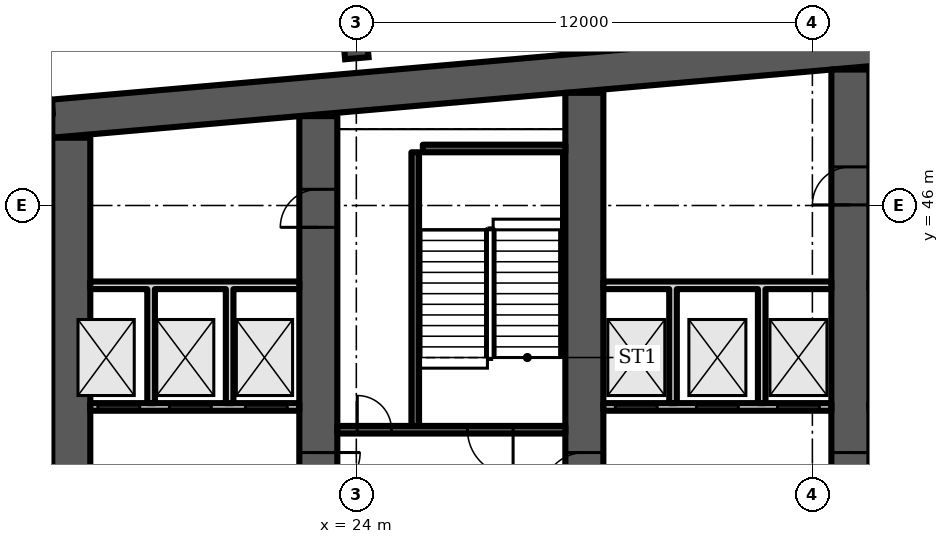
"""IFC4 building model, lengths in metres.
Left out: names, types, materials, properties, quantities, classifications, styles, units other than length and angle.
Written with IfcOpenShell. Run it as: python <this file> out.ifc"""

import sys

from ifc_helpers import new_model, si_unit, direction, frame, frame_2d, origin, origin_2d, place, context, subcontext, project, spatial, polyline, rectangle, i_section, outline, extrude, element, fill, save


model = new_model("IFC4")
c1 = context("Model", 3, precision=1e-05, world=origin(), true_north=direction((0.0, 1.0)))
c2 = subcontext(c1, "Body", "Model", "MODEL_VIEW")
j1 = project(units=[si_unit("LENGTHUNIT", "METRE"), si_unit("PLANEANGLEUNIT", "RADIAN")], contexts=[c1])
p1 = place(None, origin())
s1 = spatial("IfcSite", under=j1, at=p1, CompositionType="ELEMENT")
p2 = place(p1, origin())
s2 = spatial("IfcBuilding", under=s1, at=p2, CompositionType="ELEMENT")
p3 = place(p2, frame((0.0, 0.0, 147.1)))
s3 = spatial("IfcBuildingStorey", under=s2, at=p3, CompositionType="ELEMENT", Elevation=147.1)
p4 = place(p3, frame((0.0, 0.0, -0.0)))
e1 = element("IfcWall", 1, at=p4, inside=s3, PredefinedType="SHEAR", context=c2, shape_type="SweptSolid", body=[
    extrude(outline(polyline([(16.0, 47.784), (40.5, 49.927), (65.0, 47.784), (65.0, 48.787), (40.5, 50.931), (16.0, 48.787), (16.0, 47.784)])), origin(), (0.0, 0.0, 1.0), 4.8),
])
p5 = place(p3, frame((16.5, 35.0, 0.0), z_axis=(0.0, 0.0, 1.0), x_axis=(0.0, 1.0, 0.0)))
e2 = element("IfcWall", 2, at=p5, inside=s3, PredefinedType="SHEAR", context=c2, shape_type="SweptSolid", body=[
    extrude(rectangle(XDim=12.784, YDim=1.0, at=frame_2d((6.392, 0.0))), origin(), (0.0, 0.0, 1.0), 4.8),
])
p6 = place(p3, frame((23.0, 35.0, 0.0), z_axis=(0.0, 0.0, 1.0), x_axis=(0.0, 1.0, 0.0)))
e3 = element("IfcWall", 3, at=p6, inside=s3, PredefinedType="SHEAR", context=c2, shape_type="SweptSolid", body=[
    extrude(rectangle(XDim=13.352, YDim=1.0, at=frame_2d((6.676, 0.0))), origin(), (0.0, 0.0, 1.0), 4.8),
])
p7 = place(p6, frame((10.426, 0.0, 0.0)))
e4 = element("IfcOpeningElement", 4, at=p7, cuts=e3, PredefinedType="OPENING", context=c2, shape_type="SweptSolid", body=[
    extrude(rectangle(XDim=1.0, YDim=2.1, at=frame_2d((0.5, 1.05))), frame((0.0, 0.51, 0.0), z_axis=(0.0, -1.0, 0.0), x_axis=(1.0, 0.0, 0.0)), (0.0, 0.0, 1.0), 1.02),
])
p8 = place(p6, frame((3.4, 0.0, 0.0)))
e5 = element("IfcOpeningElement", 5, at=p8, cuts=e3, PredefinedType="OPENING", context=c2, shape_type="SweptSolid", body=[
    extrude(rectangle(XDim=1.1, YDim=2.1, at=frame_2d((0.55, 1.05))), frame((0.0, 0.51, 0.0), z_axis=(0.0, -1.0, 0.0), x_axis=(1.0, 0.0, 0.0)), (0.0, 0.0, 1.0), 1.02),
])
p9 = place(p3, frame((30.0, 35.0, 0.0), z_axis=(0.0, 0.0, 1.0), x_axis=(0.0, 1.0, 0.0)))
e6 = element("IfcWall", 6, at=p9, inside=s3, PredefinedType="SHEAR", context=c2, shape_type="SweptSolid", body=[
    extrude(rectangle(XDim=13.965, YDim=1.0, at=frame_2d((6.982, 0.0))), origin(), (0.0, 0.0, 1.0), 4.8),
])
p10 = place(p9, frame((3.4, 0.0, 0.0)))
e7 = element("IfcOpeningElement", 7, at=p10, cuts=e6, PredefinedType="OPENING", context=c2, shape_type="SweptSolid", body=[
    extrude(rectangle(XDim=1.1, YDim=2.1, at=frame_2d((0.55, 1.05))), frame((0.0, 0.51, 0.0), z_axis=(0.0, -1.0, 0.0), x_axis=(1.0, 0.0, 0.0)), (0.0, 0.0, 1.0), 1.02),
])
p11 = place(p3, frame((37.0, 35.0, 0.0), z_axis=(0.0, 0.0, 1.0), x_axis=(0.0, 1.0, 0.0)))
e8 = element("IfcWall", 8, at=p11, inside=s3, PredefinedType="SHEAR", context=c2, shape_type="SweptSolid", body=[
    extrude(rectangle(XDim=14.577, YDim=1.0, at=frame_2d((7.289, 0.0))), origin(), (0.0, 0.0, 1.0), 4.8),
])
p12 = place(p11, frame((11.016, 0.0, 0.0)))
e9 = element("IfcOpeningElement", 9, at=p12, cuts=e8, PredefinedType="OPENING", context=c2, shape_type="SweptSolid", body=[
    extrude(rectangle(XDim=1.0, YDim=2.1, at=frame_2d((0.5, 1.05))), frame((0.0, 0.51, 0.0), z_axis=(0.0, -1.0, 0.0), x_axis=(1.0, 0.0, 0.0)), (0.0, 0.0, 1.0), 1.02),
])
p13 = place(p11, frame((3.4, 0.0, 0.0)))
e10 = element("IfcOpeningElement", 10, at=p13, cuts=e8, PredefinedType="OPENING", context=c2, shape_type="SweptSolid", body=[
    extrude(rectangle(XDim=1.1, YDim=2.1, at=frame_2d((0.55, 1.05))), frame((0.0, 0.51, 0.0), z_axis=(0.0, -1.0, 0.0), x_axis=(1.0, 0.0, 0.0)), (0.0, 0.0, 1.0), 1.02),
])
p14 = place(p3, frame((24.0, 50.027, 0.0), z_axis=(0.0, 0.0, 1.0), x_axis=(-0.087156, 0.996198, 0.0)))
e11 = element("IfcColumn", 11, at=p14, inside=s3, PredefinedType="COLUMN", context=c2, shape_type="SweptSolid", body=[
    extrude(i_section(OverallWidth=0.305, OverallDepth=0.62, WebThickness=0.021, FlangeThickness=0.04, FilletRadius=0.027, at=origin_2d()), origin(), (0.0, 0.0, 1.0), 4.8),
])
p15 = place(p3, frame((16.0, 48.587, 0.0), z_axis=(0.0, 0.0, 1.0), x_axis=(-0.996194, -0.087168, 0.0)))
e12 = element("IfcWall", 12, at=p15, inside=s3, PredefinedType="SOLIDWALL", context=c2, shape_type="SweptSolid", body=[
    extrude(rectangle(XDim=2.994, YDim=0.4, at=frame_2d((1.497, 0.0))), origin(), (0.0, 0.0, 1.0), 4.4),
])
p16 = place(p3, frame((17.0, 40.7, 0.0), z_axis=(0.0, 0.0, 1.0), x_axis=(1.0, 0.0, 0.0)))
e13 = element("IfcWall", 13, at=p16, inside=s3, PredefinedType="PARTITIONING", context=c2, shape_type="SweptSolid", body=[
    extrude(rectangle(XDim=5.5, YDim=0.2, at=frame_2d((2.75, 0.0))), origin(), (0.0, 0.0, 1.0), 4.4),
])
p17 = place(p16, frame((0.2, 0.0, 0.0)))
e14 = element("IfcOpeningElement", 14, at=p17, cuts=e13, PredefinedType="OPENING", context=c2, shape_type="SweptSolid", body=[
    extrude(rectangle(XDim=1.1, YDim=2.1, at=frame_2d((0.55, 1.05))), frame((0.0, 0.11, 0.0), z_axis=(0.0, -1.0, 0.0), x_axis=(1.0, 0.0, 0.0)), (0.0, 0.0, 1.0), 0.22),
])
p18 = place(p16, frame((2.083, 0.0, 0.0)))
e15 = element("IfcOpeningElement", 15, at=p18, cuts=e13, PredefinedType="OPENING", context=c2, shape_type="SweptSolid", body=[
    extrude(rectangle(XDim=1.1, YDim=2.1, at=frame_2d((0.55, 1.05))), frame((0.0, 0.11, 0.0), z_axis=(0.0, -1.0, 0.0), x_axis=(1.0, 0.0, 0.0)), (0.0, 0.0, 1.0), 0.22),
])
p19 = place(p16, frame((4.083, 0.0, 0.0)))
e16 = element("IfcOpeningElement", 16, at=p19, cuts=e13, PredefinedType="OPENING", context=c2, shape_type="SweptSolid", body=[
    extrude(rectangle(XDim=1.1, YDim=2.1, at=frame_2d((0.55, 1.05))), frame((0.0, 0.11, 0.0), z_axis=(0.0, -1.0, 0.0), x_axis=(1.0, 0.0, 0.0)), (0.0, 0.0, 1.0), 0.22),
])
p20 = place(p3, frame((0.0, 0.0, -0.0)))
e17 = element("IfcWall", 17, at=p20, inside=s3, PredefinedType="PARTITIONING", context=c2, shape_type="SweptSolid", body=[
    extrude(outline(polyline([(18.7, 40.8), (18.5, 40.8), (18.5, 43.8), (17.0, 43.8), (17.0, 44.0), (22.5, 44.0), (22.5, 43.8), (20.767, 43.8), (20.767, 40.8), (20.567, 40.8), (20.567, 43.8), (18.7, 43.8), (18.7, 40.8)])), origin(), (0.0, 0.0, 1.0), 4.4),
])
p21 = place(p3, frame((23.5, 40.1, 0.0), z_axis=(0.0, 0.0, 1.0), x_axis=(1.0, 0.0, 0.0)))
e18 = element("IfcWall", 18, at=p21, inside=s3, PredefinedType="SHEAR", context=c2, shape_type="SweptSolid", body=[
    extrude(rectangle(XDim=6.0, YDim=0.2, at=frame_2d((3.0, 0.0))), origin(), (0.0, 0.0, 1.0), 4.4),
])
p22 = place(p21, frame((3.425, 0.0, 0.0)))
e19 = element("IfcOpeningElement", 19, at=p22, cuts=e18, PredefinedType="OPENING", context=c2, shape_type="SweptSolid", body=[
    extrude(rectangle(XDim=1.2, YDim=2.1, at=frame_2d((0.6, 1.05))), frame((0.0, 0.11, 0.0), z_axis=(0.0, -1.0, 0.0), x_axis=(1.0, 0.0, 0.0)), (0.0, 0.0, 1.0), 0.22),
])
p23 = place(p21, frame((0.525, 0.0, 0.0)))
e20 = element("IfcOpeningElement", 20, at=p23, cuts=e18, PredefinedType="OPENING", context=c2, shape_type="SweptSolid", body=[
    extrude(rectangle(XDim=0.9, YDim=2.1, at=frame_2d((0.45, 1.05))), frame((0.0, 0.11, 0.0), z_axis=(0.0, -1.0, 0.0), x_axis=(1.0, 0.0, 0.0)), (0.0, 0.0, 1.0), 0.22),
])
p24 = place(p3, frame((25.55, 40.2, 0.0), z_axis=(0.0, 0.0, 1.0), x_axis=(0.0, 1.0, 0.0)))
e21 = element("IfcWall", 21, at=p24, inside=s3, PredefinedType="SHEAR", context=c2, shape_type="SweptSolid", body=[
    extrude(rectangle(XDim=7.2, YDim=0.2, at=frame_2d((3.6, 0.0))), origin(), (0.0, 0.0, 1.0), 4.4),
])
p25 = place(p3, frame((25.75, 47.5, 0.0), z_axis=(0.0, 0.0, 1.0), x_axis=(1.0, 0.0, 0.0)))
e22 = element("IfcWall", 22, at=p25, inside=s3, PredefinedType="SHEAR", context=c2, shape_type="SweptSolid", body=[
    extrude(rectangle(XDim=3.75, YDim=0.2, at=frame_2d((1.875, 0.0))), origin(), (0.0, 0.0, 1.0), 4.4),
])
p26 = place(p3, frame((30.5, 40.7, 0.0), z_axis=(0.0, 0.0, 1.0), x_axis=(1.0, 0.0, 0.0)))
e23 = element("IfcWall", 23, at=p26, inside=s3, PredefinedType="PARTITIONING", context=c2, shape_type="SweptSolid", body=[
    extrude(rectangle(XDim=6.0, YDim=0.2, at=frame_2d((3.0, 0.0))), origin(), (0.0, 0.0, 1.0), 4.4),
])
p27 = place(p26, frame((0.317, 0.0, 0.0)))
e24 = element("IfcOpeningElement", 24, at=p27, cuts=e23, PredefinedType="OPENING", context=c2, shape_type="SweptSolid", body=[
    extrude(rectangle(XDim=1.1, YDim=2.1, at=frame_2d((0.55, 1.05))), frame((0.0, 0.11, 0.0), z_axis=(0.0, -1.0, 0.0), x_axis=(1.0, 0.0, 0.0)), (0.0, 0.0, 1.0), 0.22),
])
p28 = place(p26, frame((2.45, 0.0, 0.0)))
e25 = element("IfcOpeningElement", 25, at=p28, cuts=e23, PredefinedType="OPENING", context=c2, shape_type="SweptSolid", body=[
    extrude(rectangle(XDim=1.1, YDim=2.1, at=frame_2d((0.55, 1.05))), frame((0.0, 0.11, 0.0), z_axis=(0.0, -1.0, 0.0), x_axis=(1.0, 0.0, 0.0)), (0.0, 0.0, 1.0), 0.22),
])
p29 = place(p26, frame((4.583, 0.0, 0.0)))
e26 = element("IfcOpeningElement", 26, at=p29, cuts=e23, PredefinedType="OPENING", context=c2, shape_type="SweptSolid", body=[
    extrude(rectangle(XDim=1.1, YDim=2.1, at=frame_2d((0.55, 1.05))), frame((0.0, 0.11, 0.0), z_axis=(0.0, -1.0, 0.0), x_axis=(1.0, 0.0, 0.0)), (0.0, 0.0, 1.0), 0.22),
])
p30 = place(p3, frame((0.0, 0.0, -0.0)))
e27 = element("IfcWall", 27, at=p30, inside=s3, PredefinedType="PARTITIONING", context=c2, shape_type="SweptSolid", body=[
    extrude(outline(polyline([(32.433, 40.8), (32.233, 40.8), (32.233, 43.8), (30.5, 43.8), (30.5, 44.0), (36.5, 44.0), (36.5, 43.8), (34.767, 43.8), (34.767, 40.8), (34.567, 40.8), (34.567, 43.8), (32.433, 43.8), (32.433, 40.8)])), origin(), (0.0, 0.0, 1.0), 4.4),
])
p31 = place(p17, origin())
e28 = element("IfcDoor", 28, at=p31, inside=s3, OperationType="DOUBLE_DOOR_SLIDING", PredefinedType="DOOR", context=c2, shape_type="SweptSolid", body=[
    extrude(rectangle(XDim=1.1, YDim=2.1, at=frame_2d((0.55, 1.05))), frame((0.0, 0.025, 0.0), z_axis=(0.0, -1.0, 0.0), x_axis=(1.0, 0.0, 0.0)), (0.0, 0.0, 1.0), 0.05),
])
fill(e14, e28)
p32 = place(p18, origin())
e29 = element("IfcDoor", 29, at=p32, inside=s3, OperationType="DOUBLE_DOOR_SLIDING", PredefinedType="DOOR", context=c2, shape_type="SweptSolid", body=[
    extrude(rectangle(XDim=1.1, YDim=2.1, at=frame_2d((0.55, 1.05))), frame((0.0, 0.025, 0.0), z_axis=(0.0, -1.0, 0.0), x_axis=(1.0, 0.0, 0.0)), (0.0, 0.0, 1.0), 0.05),
])
fill(e15, e29)
p33 = place(p19, origin())
e30 = element("IfcDoor", 30, at=p33, inside=s3, OperationType="DOUBLE_DOOR_SLIDING", PredefinedType="DOOR", context=c2, shape_type="SweptSolid", body=[
    extrude(rectangle(XDim=1.1, YDim=2.1, at=frame_2d((0.55, 1.05))), frame((0.0, 0.025, 0.0), z_axis=(0.0, -1.0, 0.0), x_axis=(1.0, 0.0, 0.0)), (0.0, 0.0, 1.0), 0.05),
])
fill(e16, e30)
p34 = place(p7, origin())
e31 = element("IfcDoor", 31, at=p34, inside=s3, OperationType="SINGLE_SWING_LEFT", PredefinedType="DOOR", context=c2, shape_type="SweptSolid", body=[
    extrude(rectangle(XDim=1.0, YDim=2.1, at=frame_2d((0.5, 1.05))), frame((0.0, 0.5, 0.0), z_axis=(0.0, -1.0, 0.0), x_axis=(1.0, 0.0, 0.0)), (0.0, 0.0, 1.0), 1.0),
])
fill(e4, e31)
p35 = place(p22, origin())
e32 = element("IfcDoor", 32, at=p35, inside=s3, OperationType="SINGLE_SWING_RIGHT", PredefinedType="DOOR", context=c2, shape_type="SweptSolid", body=[
    extrude(rectangle(XDim=1.2, YDim=2.1, at=frame_2d((0.6, 1.05))), frame((0.0, 0.025, 0.0), z_axis=(0.0, -1.0, 0.0), x_axis=(1.0, 0.0, 0.0)), (0.0, 0.0, 1.0), 0.05),
])
fill(e19, e32)
p36 = place(p23, origin())
e33 = element("IfcDoor", 33, at=p36, inside=s3, OperationType="SINGLE_SWING_LEFT", PredefinedType="DOOR", context=c2, shape_type="SweptSolid", body=[
    extrude(rectangle(XDim=0.9, YDim=2.1, at=frame_2d((0.45, 1.05))), frame((0.0, 0.025, 0.0), z_axis=(0.0, -1.0, 0.0), x_axis=(1.0, 0.0, 0.0)), (0.0, 0.0, 1.0), 0.05),
])
fill(e20, e33)
p37 = place(p27, origin())
e34 = element("IfcDoor", 34, at=p37, inside=s3, OperationType="DOUBLE_DOOR_SLIDING", PredefinedType="DOOR", context=c2, shape_type="SweptSolid", body=[
    extrude(rectangle(XDim=1.1, YDim=2.1, at=frame_2d((0.55, 1.05))), frame((0.0, 0.025, 0.0), z_axis=(0.0, -1.0, 0.0), x_axis=(1.0, 0.0, 0.0)), (0.0, 0.0, 1.0), 0.05),
])
fill(e24, e34)
p38 = place(p28, origin())
e35 = element("IfcDoor", 35, at=p38, inside=s3, OperationType="DOUBLE_DOOR_SLIDING", PredefinedType="DOOR", context=c2, shape_type="SweptSolid", body=[
    extrude(rectangle(XDim=1.1, YDim=2.1, at=frame_2d((0.55, 1.05))), frame((0.0, 0.025, 0.0), z_axis=(0.0, -1.0, 0.0), x_axis=(1.0, 0.0, 0.0)), (0.0, 0.0, 1.0), 0.05),
])
fill(e25, e35)
p39 = place(p29, origin())
e36 = element("IfcDoor", 36, at=p39, inside=s3, OperationType="DOUBLE_DOOR_SLIDING", PredefinedType="DOOR", context=c2, shape_type="SweptSolid", body=[
    extrude(rectangle(XDim=1.1, YDim=2.1, at=frame_2d((0.55, 1.05))), frame((0.0, 0.025, 0.0), z_axis=(0.0, -1.0, 0.0), x_axis=(1.0, 0.0, 0.0)), (0.0, 0.0, 1.0), 0.05),
])
fill(e26, e36)
p40 = place(p12, origin())
e37 = element("IfcDoor", 37, at=p40, inside=s3, OperationType="SINGLE_SWING_LEFT", PredefinedType="DOOR", context=c2, shape_type="SweptSolid", body=[
    extrude(rectangle(XDim=1.0, YDim=2.1, at=frame_2d((0.5, 1.05))), frame((0.0, 0.5, 0.0), z_axis=(0.0, -1.0, 0.0), x_axis=(1.0, 0.0, 0.0)), (0.0, 0.0, 1.0), 1.0),
])
fill(e9, e37)
p41 = place(p8, origin())
e38 = element("IfcDoor", 38, at=p41, inside=s3, OperationType="SINGLE_SWING_RIGHT", PredefinedType="DOOR", context=c2, shape_type="SweptSolid", body=[
    extrude(rectangle(XDim=1.1, YDim=2.1, at=frame_2d((0.55, 1.05))), frame((0.0, 0.025, 0.0), z_axis=(0.0, -1.0, 0.0), x_axis=(1.0, 0.0, 0.0)), (0.0, 0.0, 1.0), 0.05),
])
fill(e5, e38)
p42 = place(p10, origin())
e39 = element("IfcDoor", 39, at=p42, inside=s3, OperationType="SINGLE_SWING_LEFT", PredefinedType="DOOR", context=c2, shape_type="SweptSolid", body=[
    extrude(rectangle(XDim=1.1, YDim=2.1, at=frame_2d((0.55, 1.05))), frame((0.0, 0.025, 0.0), z_axis=(0.0, -1.0, 0.0), x_axis=(1.0, 0.0, 0.0)), (0.0, 0.0, 1.0), 0.05),
])
fill(e7, e39)
p43 = place(p13, origin())
e40 = element("IfcDoor", 40, at=p43, inside=s3, OperationType="SINGLE_SWING_RIGHT", PredefinedType="DOOR", context=c2, shape_type="SweptSolid", body=[
    extrude(rectangle(XDim=1.1, YDim=2.1, at=frame_2d((0.55, 1.05))), frame((0.0, 0.025, 0.0), z_axis=(0.0, -1.0, 0.0), x_axis=(1.0, 0.0, 0.0)), (0.0, 0.0, 1.0), 0.05),
])
fill(e10, e40)
save(model, sys.argv[1])
